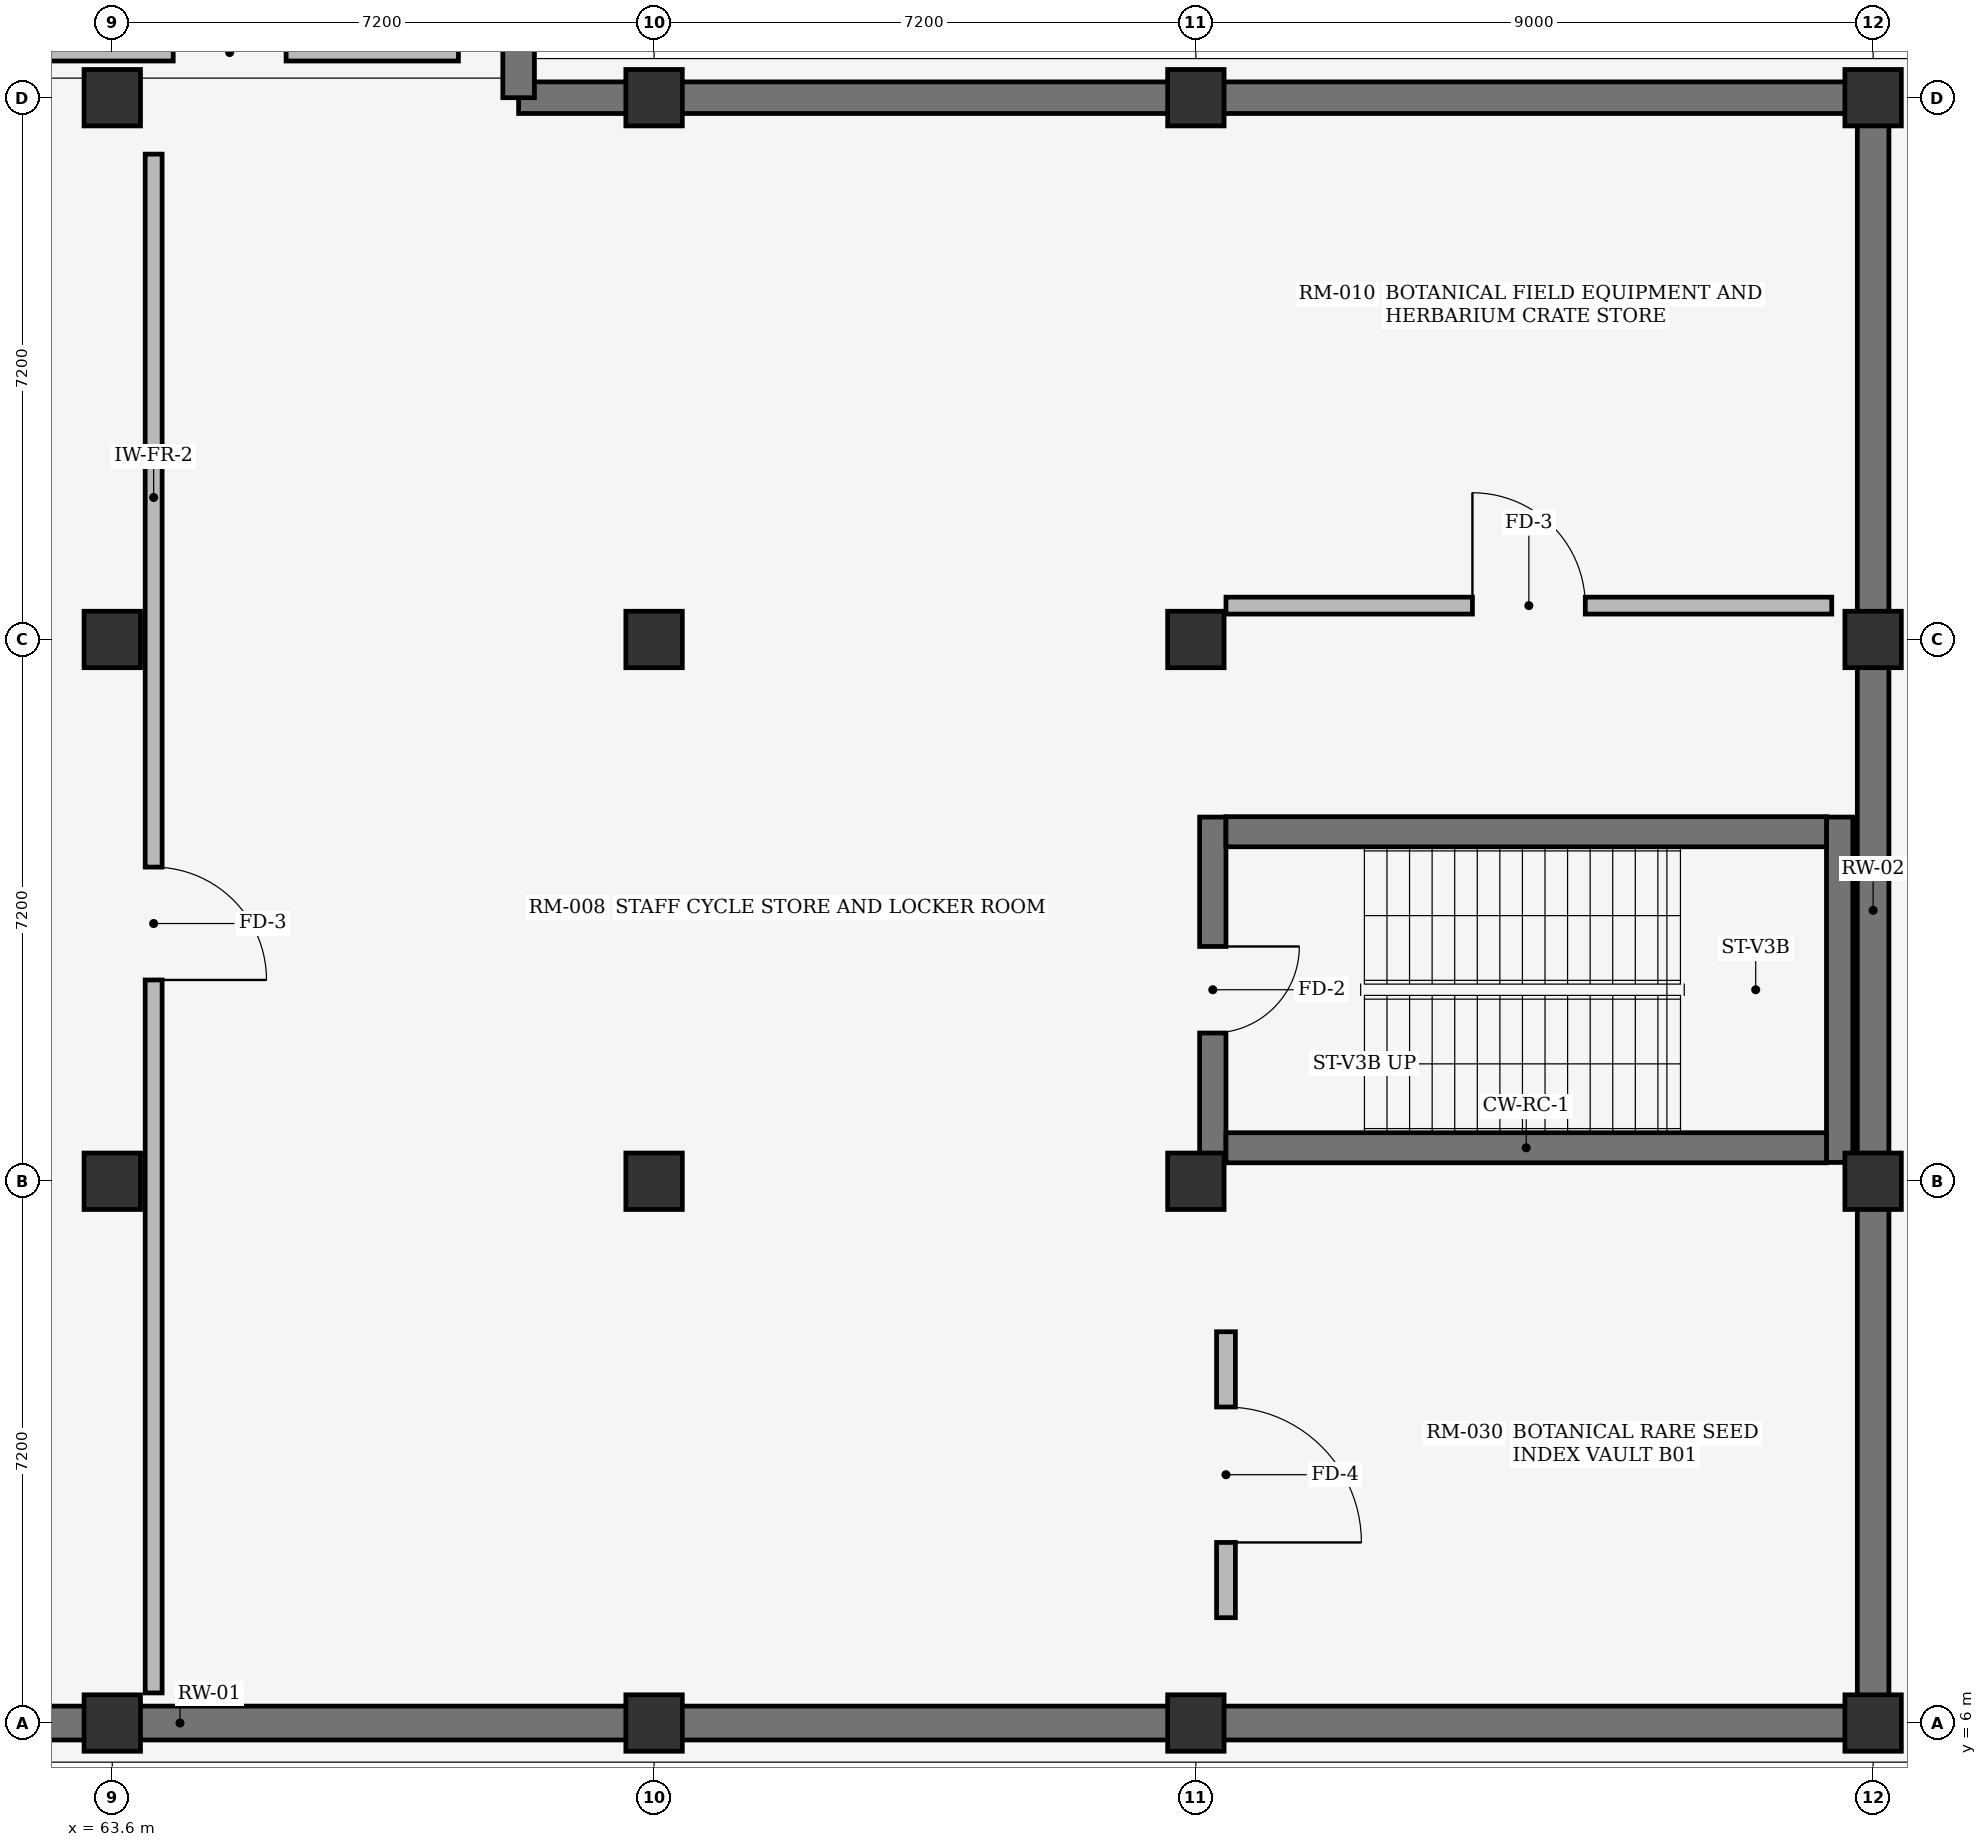
"""IFC4 building model, lengths in metres.
Left out: names, types, materials, properties, quantities, classifications, styles, units other than length and angle.
Written with IfcOpenShell. Run it as: python <this file> out.ifc"""

import sys

from ifc_helpers import new_model, si_unit, direction, frame, frame_2d, origin, origin_2d, place, context, subcontext, project, spatial, rectangle, extrude, element, fill, save


model = new_model("IFC4")
c1 = context("Model", 3, precision=1e-05, world=origin(), true_north=direction((0.0, 1.0)))
c2 = subcontext(c1, "Body", "Model", "MODEL_VIEW")
j1 = project(units=[si_unit("LENGTHUNIT", "METRE"), si_unit("PLANEANGLEUNIT", "RADIAN")], contexts=[c1])
p1 = place(None, origin())
s1 = spatial("IfcSite", under=j1, at=p1, CompositionType="ELEMENT")
p2 = place(p1, origin())
s2 = spatial("IfcBuilding", under=s1, at=p2, CompositionType="ELEMENT")
p3 = place(p2, frame((0.0, 0.0, -4.8)))
s3 = spatial("IfcBuildingStorey", under=s2, at=p3, CompositionType="ELEMENT", Elevation=-4.8)
for number, where, z_axis, x_axis in (
    (1, (63.6, 6.0, 0.0), (0.0, 0.0, 1.0), (1.0, 0.0, 0.0)),
    (2, (63.6, 13.2, 0.0), (0.0, 0.0, 1.0), (1.0, 0.0, 0.0)),
    (3, (63.6, 20.4, 0.0), (0.0, 0.0, 1.0), (1.0, 0.0, 0.0)),
    (4, (63.6, 27.6, 0.0), (0.0, 0.0, 1.0), (1.0, 0.0, 0.0)),
    (5, (70.8, 6.0, 0.0), (0.0, 0.0, 1.0), (1.0, 0.0, 0.0)),
    (6, (70.8, 13.2, 0.0), (0.0, 0.0, 1.0), (1.0, 0.0, 0.0)),
    (7, (70.8, 20.4, 0.0), (0.0, 0.0, 1.0), (1.0, 0.0, 0.0)),
    (8, (70.8, 27.6, 0.0), (0.0, 0.0, 1.0), (1.0, 0.0, 0.0)),
    (9, (78.0, 6.0, 0.0), (0.0, 0.0, 1.0), (1.0, 0.0, 0.0)),
    (10, (78.0, 13.2, 0.0), (0.0, 0.0, 1.0), (1.0, 0.0, 0.0)),
    (11, (78.0, 20.4, 0.0), (0.0, 0.0, 1.0), (1.0, 0.0, 0.0)),
    (12, (78.0, 27.6, 0.0), (0.0, 0.0, 1.0), (1.0, 0.0, 0.0)),
    (13, (87.0, 6.0, 0.0), (0.0, 0.0, 1.0), (1.0, 0.0, 0.0)),
    (14, (87.0, 13.2, 0.0), (0.0, 0.0, 1.0), (1.0, 0.0, 0.0)),
    (15, (87.0, 20.4, 0.0), (0.0, 0.0, 1.0), (1.0, 0.0, 0.0)),
    (16, (87.0, 27.6, 0.0), (0.0, 0.0, 1.0), (1.0, 0.0, 0.0)),
):
    element("IfcColumn", number, at=place(p3, frame(where, z_axis=z_axis, x_axis=x_axis)), inside=s3, PredefinedType="COLUMN", context=c2, shape_type="SweptSolid", body=[
        extrude(rectangle(XDim=0.75, YDim=0.75, at=origin_2d()), origin(), (0.0, 0.0, 1.0), 4.5),
    ])
p4 = place(p3, frame((42.0, 6.0, 0.0), z_axis=(0.0, 0.0, 1.0), x_axis=(1.0, 0.0, 0.0)))
e17 = element("IfcWall", 17, at=p4, inside=s3, PredefinedType="USERDEFINED", context=c2, shape_type="SweptSolid", body=[
    extrude(rectangle(XDim=45.0, YDim=0.45, at=frame_2d((22.5, 0.0))), origin(), (0.0, 0.0, 1.0), 4.5),
])
p5 = place(p3, frame((87.0, 6.0, 0.0), z_axis=(0.0, 0.0, 1.0), x_axis=(0.0, 1.0, 0.0)))
e18 = element("IfcWall", 18, at=p5, inside=s3, PredefinedType="USERDEFINED", context=c2, shape_type="SweptSolid", body=[
    extrude(rectangle(XDim=21.6, YDim=0.42, at=frame_2d((10.8, 0.0))), origin(), (0.0, 0.0, 1.0), 4.5),
])
p6 = place(p3, frame((87.0, 27.6, 0.0), z_axis=(0.0, 0.0, 1.0), x_axis=(-1.0, 0.0, 0.0)))
e19 = element("IfcWall", 19, at=p6, inside=s3, PredefinedType="USERDEFINED", context=c2, shape_type="SweptSolid", body=[
    extrude(rectangle(XDim=18.0, YDim=0.42, at=frame_2d((9.0, 0.0))), origin(), (0.0, 0.0, 1.0), 4.5),
])
p7 = place(p3, frame((69.0, 27.6, 0.0), z_axis=(0.0, 0.0, 1.0), x_axis=(0.0, 1.0, 0.0)))
e20 = element("IfcWall", 20, at=p7, inside=s3, PredefinedType="USERDEFINED", context=c2, shape_type="SweptSolid", body=[
    extrude(rectangle(XDim=36.0, YDim=0.42, at=frame_2d((18.0, 0.0))), origin(), (0.0, 0.0, 1.0), 4.5),
])
p8 = place(p3, frame((78.225, 13.45, 0.0), z_axis=(0.0, 0.0, 1.0), x_axis=(0.0, 1.0, 0.0)))
e21 = element("IfcWall", 21, at=p8, inside=s3, PredefinedType="SHEAR", context=c2, shape_type="SweptSolid", body=[
    extrude(rectangle(XDim=4.59, YDim=0.35, at=frame_2d((2.295, 0.0))), origin(), (0.0, 0.0, 1.0), 4.5),
])
p9 = place(p8, frame((1.72, 0.0, 0.0)))
e22 = element("IfcOpeningElement", 22, at=p9, cuts=e21, PredefinedType="OPENING", context=c2, shape_type="SweptSolid", body=[
    extrude(rectangle(XDim=1.15, YDim=2.2, at=frame_2d((0.575, 1.1))), frame((0.0, 0.185, 0.0), z_axis=(0.0, -1.0, 0.0), x_axis=(1.0, 0.0, 0.0)), (0.0, 0.0, 1.0), 0.37),
])
p10 = place(p3, frame((86.555, 13.45, 0.0), z_axis=(0.0, 0.0, 1.0), x_axis=(0.0, 1.0, 0.0)))
e23 = element("IfcWall", 23, at=p10, inside=s3, PredefinedType="SHEAR", context=c2, shape_type="SweptSolid", body=[
    extrude(rectangle(XDim=4.59, YDim=0.35, at=frame_2d((2.295, 0.0))), origin(), (0.0, 0.0, 1.0), 4.5),
])
for number, where, z_axis, x_axis in (
    (24, (78.4, 13.645, 0.0), (0.0, 0.0, 1.0), (1.0, 0.0, 0.0)),
    (25, (78.4, 17.845, 0.0), (0.0, 0.0, 1.0), (1.0, 0.0, 0.0)),
):
    element("IfcWall", number, at=place(p3, frame(where, z_axis=z_axis, x_axis=x_axis)), inside=s3, PredefinedType="SHEAR", context=c2, shape_type="SweptSolid", body=[
        extrude(rectangle(XDim=7.98, YDim=0.4, at=frame_2d((3.99, 0.0))), origin(), (0.0, 0.0, 1.0), 4.5),
    ])
p11 = place(p3, frame((64.15, 6.4, 0.0), z_axis=(0.0, 0.0, 1.0), x_axis=(0.0, 1.0, 0.0)))
e26 = element("IfcWall", 26, at=p11, inside=s3, PredefinedType="SOLIDWALL", context=c2, shape_type="SweptSolid", body=[
    extrude(rectangle(XDim=20.45, YDim=0.225, at=frame_2d((10.225, 0.0))), origin(), (0.0, 0.0, 1.0), 4.48),
])
p12 = place(p11, frame((9.475, 0.0, 0.0)))
e27 = element("IfcOpeningElement", 27, at=p12, cuts=e26, PredefinedType="OPENING", context=c2, shape_type="SweptSolid", body=[
    extrude(rectangle(XDim=1.5, YDim=2.2, at=frame_2d((0.75, 1.1))), frame((0.0, 0.123, 0.0), z_axis=(0.0, -1.0, 0.0), x_axis=(1.0, 0.0, 0.0)), (0.0, 0.0, 1.0), 0.245),
])
p13 = place(p3, frame((60.8, 28.2, 0.0), z_axis=(0.0, 0.0, 1.0), x_axis=(1.0, 0.0, 0.0)))
e28 = element("IfcWall", 28, at=p13, inside=s3, PredefinedType="SOLIDWALL", context=c2, shape_type="SweptSolid", body=[
    extrude(rectangle(XDim=7.4, YDim=0.225, at=frame_2d((3.7, 0.0))), origin(), (0.0, 0.0, 1.0), 3.48),
])
p14 = place(p13, frame((3.61, 0.0, 0.0)))
e29 = element("IfcOpeningElement", 29, at=p14, cuts=e28, PredefinedType="OPENING", context=c2, shape_type="SweptSolid", body=[
    extrude(rectangle(XDim=1.5, YDim=2.2, at=frame_2d((0.75, 1.1))), frame((0.0, 0.123, 0.0), z_axis=(0.0, -1.0, 0.0), x_axis=(1.0, 0.0, 0.0)), (0.0, 0.0, 1.0), 0.245),
])
p15 = place(p3, frame((78.4, 20.85, 0.0), z_axis=(0.0, 0.0, 1.0), x_axis=(1.0, 0.0, 0.0)))
e30 = element("IfcWall", 30, at=p15, inside=s3, PredefinedType="SOLIDWALL", context=c2, shape_type="SweptSolid", body=[
    extrude(rectangle(XDim=8.05, YDim=0.225, at=frame_2d((4.025, 0.0))), origin(), (0.0, 0.0, 1.0), 4.48),
])
p16 = place(p15, frame((3.275, 0.0, 0.0)))
e31 = element("IfcOpeningElement", 31, at=p16, cuts=e30, PredefinedType="OPENING", context=c2, shape_type="SweptSolid", body=[
    extrude(rectangle(XDim=1.5, YDim=2.2, at=frame_2d((0.75, 1.1))), frame((0.0, 0.123, 0.0), z_axis=(0.0, -1.0, 0.0), x_axis=(1.0, 0.0, 0.0)), (0.0, 0.0, 1.0), 0.245),
])
p17 = place(p3, frame((78.4, 7.4, 0.0), z_axis=(0.0, 0.0, 1.0), x_axis=(0.0, 1.0, 0.0)))
e32 = element("IfcWall", 32, at=p17, inside=s3, PredefinedType="SOLIDWALL", context=c2, shape_type="SweptSolid", body=[
    extrude(rectangle(XDim=3.8, YDim=0.25, at=frame_2d((1.9, 0.0))), origin(), (0.0, 0.0, 1.0), 4.48),
])
p18 = place(p17, frame((1.0, 0.0, 0.0)))
e33 = element("IfcOpeningElement", 33, at=p18, cuts=e32, PredefinedType="OPENING", context=c2, shape_type="SweptSolid", body=[
    extrude(rectangle(XDim=1.8, YDim=2.25, at=frame_2d((0.9, 1.125))), frame((0.0, 0.135, 0.0), z_axis=(0.0, -1.0, 0.0), x_axis=(1.0, 0.0, 0.0)), (0.0, 0.0, 1.0), 0.27),
])
p19 = place(p9, origin())
e34 = element("IfcDoor", 34, at=p19, inside=s3, OperationType="SINGLE_SWING_RIGHT", PredefinedType="DOOR", context=c2, shape_type="SweptSolid", body=[
    extrude(rectangle(XDim=1.15, YDim=2.2, at=frame_2d((0.575, 1.1))), frame((0.0, 0.025, 0.0), z_axis=(0.0, -1.0, 0.0), x_axis=(1.0, 0.0, 0.0)), (0.0, 0.0, 1.0), 0.05),
])
fill(e22, e34)
p20 = place(p12, frame((1.5, 0.0, 0.0), z_axis=(0.0, 0.0, 1.0), x_axis=(-1.0, 0.0, 0.0)))
e35 = element("IfcDoor", 35, at=p20, inside=s3, OperationType="SINGLE_SWING_LEFT", PredefinedType="DOOR", context=c2, shape_type="SweptSolid", body=[
    extrude(rectangle(XDim=1.5, YDim=2.2, at=frame_2d((0.75, 1.1))), frame((0.0, 0.025, 0.0), z_axis=(0.0, -1.0, 0.0), x_axis=(1.0, 0.0, 0.0)), (0.0, 0.0, 1.0), 0.05),
])
fill(e27, e35)
p21 = place(p14, origin())
e36 = element("IfcDoor", 36, at=p21, inside=s3, OperationType="SINGLE_SWING_LEFT", PredefinedType="DOOR", context=c2, shape_type="SweptSolid", body=[
    extrude(rectangle(XDim=1.5, YDim=2.2, at=frame_2d((0.75, 1.1))), frame((0.0, 0.025, 0.0), z_axis=(0.0, -1.0, 0.0), x_axis=(1.0, 0.0, 0.0)), (0.0, 0.0, 1.0), 0.05),
])
fill(e29, e36)
p22 = place(p16, origin())
e37 = element("IfcDoor", 37, at=p22, inside=s3, OperationType="SINGLE_SWING_LEFT", PredefinedType="DOOR", context=c2, shape_type="SweptSolid", body=[
    extrude(rectangle(XDim=1.5, YDim=2.2, at=frame_2d((0.75, 1.1))), frame((0.0, 0.025, 0.0), z_axis=(0.0, -1.0, 0.0), x_axis=(1.0, 0.0, 0.0)), (0.0, 0.0, 1.0), 0.05),
])
fill(e31, e37)
p23 = place(p18, frame((1.8, 0.0, 0.0), z_axis=(0.0, 0.0, 1.0), x_axis=(-1.0, 0.0, 0.0)))
e38 = element("IfcDoor", 38, at=p23, inside=s3, OperationType="DOUBLE_DOOR_SINGLE_SWING", PredefinedType="DOOR", context=c2, shape_type="SweptSolid", body=[
    extrude(rectangle(XDim=1.8, YDim=2.25, at=frame_2d((0.9, 1.125))), frame((0.0, 0.025, 0.0), z_axis=(0.0, -1.0, 0.0), x_axis=(1.0, 0.0, 0.0)), (0.0, 0.0, 1.0), 0.05),
])
fill(e33, e38)
save(model, sys.argv[1])
